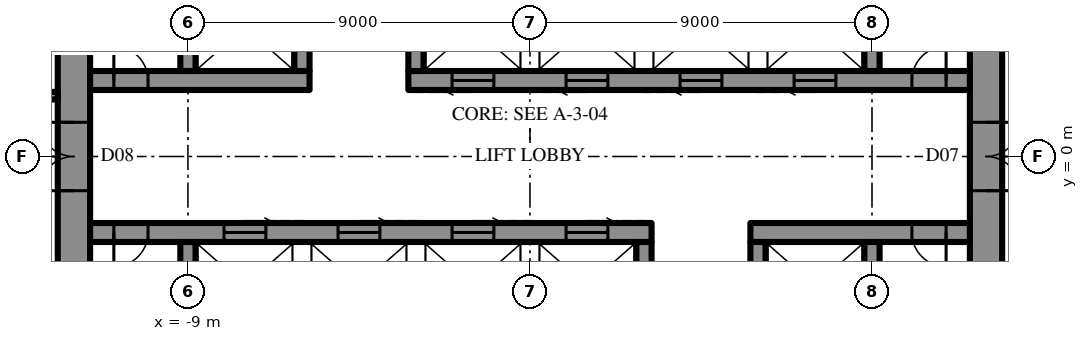
"""IFC4 building model, lengths in metres.
Left out: names, types, materials, properties, quantities, classifications, styles, units other than length and angle.
Written with IfcOpenShell. Run it as: python <this file> out.ifc"""

import sys

from ifc_helpers import new_model, si_unit, direction, frame, frame_2d, origin, place, context, subcontext, project, spatial, rectangle, extrude, element, fill, save


model = new_model("IFC4")
c1 = context("Model", 3, precision=1e-05, world=origin(), true_north=direction((0.0, 1.0)))
c2 = subcontext(c1, "Body", "Model", "MODEL_VIEW")
j1 = project(units=[si_unit("LENGTHUNIT", "METRE"), si_unit("PLANEANGLEUNIT", "RADIAN")], contexts=[c1])
p1 = place(None, origin())
s1 = spatial("IfcSite", under=j1, at=p1, CompositionType="ELEMENT")
p2 = place(p1, origin())
s2 = spatial("IfcBuilding", under=s1, at=p2, CompositionType="ELEMENT")
p3 = place(p2, frame((0.0, 0.0, 387.1)))
s3 = spatial("IfcBuildingStorey", under=s2, at=p3, CompositionType="ELEMENT", Elevation=387.1)
p4 = place(p3, frame((12.0, -10.7, 0.0), z_axis=(0.0, 0.0, 1.0), x_axis=(0.0, 1.0, 0.0)))
e1 = element("IfcWall", 1, at=p4, inside=s3, PredefinedType="SHEAR", context=c2, shape_type="SweptSolid", body=[
    extrude(rectangle(XDim=21.4, YDim=0.85, at=frame_2d((10.7, 0.0))), origin(), (0.0, 0.0, 1.0), 4.2),
])
p5 = place(p4, frame((9.8, 0.0, 0.0)))
e2 = element("IfcOpeningElement", 2, at=p5, cuts=e1, PredefinedType="OPENING", context=c2, shape_type="SweptSolid", body=[
    extrude(rectangle(XDim=1.8, YDim=2.4, at=frame_2d((0.9, 1.2))), frame((0.0, 0.435, 0.0), z_axis=(0.0, -1.0, 0.0), x_axis=(1.0, 0.0, 0.0)), (0.0, 0.0, 1.0), 0.87),
])
p6 = place(p3, frame((-12.0, 10.7, 0.0), z_axis=(0.0, 0.0, 1.0), x_axis=(0.0, -1.0, 0.0)))
e3 = element("IfcWall", 3, at=p6, inside=s3, PredefinedType="SHEAR", context=c2, shape_type="SweptSolid", body=[
    extrude(rectangle(XDim=21.4, YDim=0.85, at=frame_2d((10.7, 0.0))), origin(), (0.0, 0.0, 1.0), 4.2),
])
p7 = place(p6, frame((9.8, 0.0, 0.0)))
e4 = element("IfcOpeningElement", 4, at=p7, cuts=e3, PredefinedType="OPENING", context=c2, shape_type="SweptSolid", body=[
    extrude(rectangle(XDim=1.8, YDim=2.4, at=frame_2d((0.9, 1.2))), frame((0.0, 0.435, 0.0), z_axis=(0.0, -1.0, 0.0), x_axis=(1.0, 0.0, 0.0)), (0.0, 0.0, 1.0), 0.87),
])
p8 = place(p3, frame((-11.575, 2.0, 0.0), z_axis=(0.0, 0.0, 1.0), x_axis=(1.0, 0.0, 0.0)))
e5 = element("IfcWall", 5, at=p8, inside=s3, PredefinedType="SHEAR", context=c2, shape_type="SweptSolid", body=[
    extrude(rectangle(XDim=5.775, YDim=0.5, at=frame_2d((2.887, 0.0))), origin(), (0.0, 0.0, 1.0), 4.2),
])
p9 = place(p8, frame((0.625, 0.0, 0.0)))
e6 = element("IfcOpeningElement", 6, at=p9, cuts=e5, PredefinedType="OPENING", context=c2, shape_type="SweptSolid", body=[
    extrude(rectangle(XDim=0.9, YDim=2.2, at=frame_2d((0.45, 1.1))), frame((0.0, 0.26, 0.0), z_axis=(0.0, -1.0, 0.0), x_axis=(1.0, 0.0, 0.0)), (0.0, 0.0, 1.0), 0.52),
])
p10 = place(p3, frame((-3.2, 2.0, 0.0), z_axis=(0.0, 0.0, 1.0), x_axis=(1.0, 0.0, 0.0)))
e7 = element("IfcWall", 7, at=p10, inside=s3, PredefinedType="SHEAR", context=c2, shape_type="SweptSolid", body=[
    extrude(rectangle(XDim=14.775, YDim=0.5, at=frame_2d((7.387, 0.0))), origin(), (0.0, 0.0, 1.0), 4.2),
])
p11 = place(p10, frame((13.25, 0.0, 0.0)))
e8 = element("IfcOpeningElement", 8, at=p11, cuts=e7, PredefinedType="OPENING", context=c2, shape_type="SweptSolid", body=[
    extrude(rectangle(XDim=0.9, YDim=2.2, at=frame_2d((0.45, 1.1))), frame((0.0, 0.26, 0.0), z_axis=(0.0, -1.0, 0.0), x_axis=(1.0, 0.0, 0.0)), (0.0, 0.0, 1.0), 0.52),
])
p12 = place(p10, frame((1.15, 0.0, 0.0)))
e9 = element("IfcOpeningElement", 9, at=p12, cuts=e7, PredefinedType="OPENING", context=c2, shape_type="SweptSolid", body=[
    extrude(rectangle(XDim=1.1, YDim=2.2, at=frame_2d((0.55, 1.1))), frame((0.0, 0.26, 0.0), z_axis=(0.0, -1.0, 0.0), x_axis=(1.0, 0.0, 0.0)), (0.0, 0.0, 1.0), 0.52),
])
p13 = place(p10, frame((4.15, 0.0, 0.0)))
e10 = element("IfcOpeningElement", 10, at=p13, cuts=e7, PredefinedType="OPENING", context=c2, shape_type="SweptSolid", body=[
    extrude(rectangle(XDim=1.1, YDim=2.2, at=frame_2d((0.55, 1.1))), frame((0.0, 0.26, 0.0), z_axis=(0.0, -1.0, 0.0), x_axis=(1.0, 0.0, 0.0)), (0.0, 0.0, 1.0), 0.52),
])
p14 = place(p10, frame((7.15, 0.0, 0.0)))
e11 = element("IfcOpeningElement", 11, at=p14, cuts=e7, PredefinedType="OPENING", context=c2, shape_type="SweptSolid", body=[
    extrude(rectangle(XDim=1.1, YDim=2.2, at=frame_2d((0.55, 1.1))), frame((0.0, 0.26, 0.0), z_axis=(0.0, -1.0, 0.0), x_axis=(1.0, 0.0, 0.0)), (0.0, 0.0, 1.0), 0.52),
])
p15 = place(p10, frame((10.15, 0.0, 0.0)))
e12 = element("IfcOpeningElement", 12, at=p15, cuts=e7, PredefinedType="OPENING", context=c2, shape_type="SweptSolid", body=[
    extrude(rectangle(XDim=1.1, YDim=2.2, at=frame_2d((0.55, 1.1))), frame((0.0, 0.26, 0.0), z_axis=(0.0, -1.0, 0.0), x_axis=(1.0, 0.0, 0.0)), (0.0, 0.0, 1.0), 0.52),
])
for number, where, z_axis, x_axis in (
    (13, (-9.0, 2.25, 0.0), (0.0, 0.0, 1.0), (0.0, 1.0, 0.0)),
    (14, (-6.0, 2.25, 0.0), (0.0, 0.0, 1.0), (0.0, 1.0, 0.0)),
    (15, (-3.0, 2.25, 0.0), (0.0, 0.0, 1.0), (0.0, 1.0, 0.0)),
    (16, (9.0, 2.25, 0.0), (0.0, 0.0, 1.0), (0.0, 1.0, 0.0)),
):
    element("IfcWall", number, at=place(p3, frame(where, z_axis=z_axis, x_axis=x_axis)), inside=s3, PredefinedType="SHEAR", context=c2, shape_type="SweptSolid", body=[
        extrude(rectangle(XDim=2.3, YDim=0.4, at=frame_2d((1.15, 0.0))), origin(), (0.0, 0.0, 1.0), 4.2),
    ])
p16 = place(p3, frame((11.575, -2.0, 0.0), z_axis=(0.0, 0.0, 1.0), x_axis=(-1.0, 0.0, 0.0)))
e17 = element("IfcWall", 17, at=p16, inside=s3, PredefinedType="SHEAR", context=c2, shape_type="SweptSolid", body=[
    extrude(rectangle(XDim=5.775, YDim=0.5, at=frame_2d((2.887, 0.0))), origin(), (0.0, 0.0, 1.0), 4.2),
])
p17 = place(p16, frame((0.625, 0.0, 0.0)))
e18 = element("IfcOpeningElement", 18, at=p17, cuts=e17, PredefinedType="OPENING", context=c2, shape_type="SweptSolid", body=[
    extrude(rectangle(XDim=0.9, YDim=2.2, at=frame_2d((0.45, 1.1))), frame((0.0, 0.26, 0.0), z_axis=(0.0, -1.0, 0.0), x_axis=(1.0, 0.0, 0.0)), (0.0, 0.0, 1.0), 0.52),
])
p18 = place(p3, frame((3.2, -2.0, 0.0), z_axis=(0.0, 0.0, 1.0), x_axis=(-1.0, 0.0, 0.0)))
e19 = element("IfcWall", 19, at=p18, inside=s3, PredefinedType="SHEAR", context=c2, shape_type="SweptSolid", body=[
    extrude(rectangle(XDim=14.775, YDim=0.5, at=frame_2d((7.387, 0.0))), origin(), (0.0, 0.0, 1.0), 4.2),
])
p19 = place(p18, frame((13.25, 0.0, 0.0)))
e20 = element("IfcOpeningElement", 20, at=p19, cuts=e19, PredefinedType="OPENING", context=c2, shape_type="SweptSolid", body=[
    extrude(rectangle(XDim=0.9, YDim=2.2, at=frame_2d((0.45, 1.1))), frame((0.0, 0.26, 0.0), z_axis=(0.0, -1.0, 0.0), x_axis=(1.0, 0.0, 0.0)), (0.0, 0.0, 1.0), 0.52),
])
p20 = place(p18, frame((1.15, 0.0, 0.0)))
e21 = element("IfcOpeningElement", 21, at=p20, cuts=e19, PredefinedType="OPENING", context=c2, shape_type="SweptSolid", body=[
    extrude(rectangle(XDim=1.1, YDim=2.2, at=frame_2d((0.55, 1.1))), frame((0.0, 0.26, 0.0), z_axis=(0.0, -1.0, 0.0), x_axis=(1.0, 0.0, 0.0)), (0.0, 0.0, 1.0), 0.52),
])
p21 = place(p18, frame((4.15, 0.0, 0.0)))
e22 = element("IfcOpeningElement", 22, at=p21, cuts=e19, PredefinedType="OPENING", context=c2, shape_type="SweptSolid", body=[
    extrude(rectangle(XDim=1.1, YDim=2.2, at=frame_2d((0.55, 1.1))), frame((0.0, 0.26, 0.0), z_axis=(0.0, -1.0, 0.0), x_axis=(1.0, 0.0, 0.0)), (0.0, 0.0, 1.0), 0.52),
])
p22 = place(p18, frame((7.15, 0.0, 0.0)))
e23 = element("IfcOpeningElement", 23, at=p22, cuts=e19, PredefinedType="OPENING", context=c2, shape_type="SweptSolid", body=[
    extrude(rectangle(XDim=1.1, YDim=2.2, at=frame_2d((0.55, 1.1))), frame((0.0, 0.26, 0.0), z_axis=(0.0, -1.0, 0.0), x_axis=(1.0, 0.0, 0.0)), (0.0, 0.0, 1.0), 0.52),
])
p23 = place(p18, frame((10.15, 0.0, 0.0)))
e24 = element("IfcOpeningElement", 24, at=p23, cuts=e19, PredefinedType="OPENING", context=c2, shape_type="SweptSolid", body=[
    extrude(rectangle(XDim=1.1, YDim=2.2, at=frame_2d((0.55, 1.1))), frame((0.0, 0.26, 0.0), z_axis=(0.0, -1.0, 0.0), x_axis=(1.0, 0.0, 0.0)), (0.0, 0.0, 1.0), 0.52),
])
for number, where, z_axis, x_axis in (
    (25, (9.0, -2.25, 0.0), (0.0, 0.0, 1.0), (0.0, -1.0, 0.0)),
    (26, (6.0, -2.25, 0.0), (0.0, 0.0, 1.0), (0.0, -1.0, 0.0)),
    (27, (3.0, -2.25, 0.0), (0.0, 0.0, 1.0), (0.0, -1.0, 0.0)),
    (28, (-9.0, -2.25, 0.0), (0.0, 0.0, 1.0), (0.0, -1.0, 0.0)),
):
    element("IfcWall", number, at=place(p3, frame(where, z_axis=z_axis, x_axis=x_axis)), inside=s3, PredefinedType="SHEAR", context=c2, shape_type="SweptSolid", body=[
        extrude(rectangle(XDim=2.3, YDim=0.4, at=frame_2d((1.15, 0.0))), origin(), (0.0, 0.0, 1.0), 4.2),
    ])
p24 = place(p3, frame((-12.425, 1.6, 0.0), z_axis=(0.0, 0.0, 1.0), x_axis=(-1.0, 0.0, 0.0)))
e29 = element("IfcWall", 29, at=p24, inside=s3, PredefinedType="PARTITIONING", context=c2, shape_type="SweptSolid", body=[
    extrude(rectangle(XDim=16.558, YDim=0.2, at=frame_2d((8.279, 0.0))), origin(), (0.0, 0.0, 1.0), 4.0),
])
p25 = place(p24, frame((1.156, 0.0, 0.0)))
e30 = element("IfcOpeningElement", 30, at=p25, cuts=e29, PredefinedType="OPENING", context=c2, shape_type="SweptSolid", body=[
    extrude(rectangle(XDim=1.0, YDim=2.2, at=frame_2d((0.5, 1.1))), frame((0.0, 0.11, 0.0), z_axis=(0.0, -1.0, 0.0), x_axis=(1.0, 0.0, 0.0)), (0.0, 0.0, 1.0), 0.22),
])
p26 = place(p5, frame((1.8, 0.0, 0.0), z_axis=(0.0, 0.0, 1.0), x_axis=(-1.0, 0.0, 0.0)))
e31 = element("IfcDoor", 31, at=p26, inside=s3, OperationType="DOUBLE_DOOR_SINGLE_SWING", PredefinedType="DOOR", context=c2, shape_type="SweptSolid", body=[
    extrude(rectangle(XDim=1.8, YDim=2.4, at=frame_2d((0.9, 1.2))), frame((0.0, 0.025, 0.0), z_axis=(0.0, -1.0, 0.0), x_axis=(1.0, 0.0, 0.0)), (0.0, 0.0, 1.0), 0.05),
])
fill(e2, e31)
p27 = place(p7, frame((1.8, 0.0, 0.0), z_axis=(0.0, 0.0, 1.0), x_axis=(-1.0, 0.0, 0.0)))
e32 = element("IfcDoor", 32, at=p27, inside=s3, OperationType="DOUBLE_DOOR_SINGLE_SWING", PredefinedType="DOOR", context=c2, shape_type="SweptSolid", body=[
    extrude(rectangle(XDim=1.8, YDim=2.4, at=frame_2d((0.9, 1.2))), frame((0.0, 0.025, 0.0), z_axis=(0.0, -1.0, 0.0), x_axis=(1.0, 0.0, 0.0)), (0.0, 0.0, 1.0), 0.05),
])
fill(e4, e32)
p28 = place(p9, origin())
e33 = element("IfcDoor", 33, at=p28, inside=s3, OperationType="SINGLE_SWING_RIGHT", PredefinedType="DOOR", context=c2, shape_type="SweptSolid", body=[
    extrude(rectangle(XDim=0.9, YDim=2.2, at=frame_2d((0.45, 1.1))), frame((0.0, 0.025, 0.0), z_axis=(0.0, -1.0, 0.0), x_axis=(1.0, 0.0, 0.0)), (0.0, 0.0, 1.0), 0.05),
])
fill(e6, e33)
p29 = place(p11, origin())
e34 = element("IfcDoor", 34, at=p29, inside=s3, OperationType="SINGLE_SWING_LEFT", PredefinedType="DOOR", context=c2, shape_type="SweptSolid", body=[
    extrude(rectangle(XDim=0.9, YDim=2.2, at=frame_2d((0.45, 1.1))), frame((0.0, 0.025, 0.0), z_axis=(0.0, -1.0, 0.0), x_axis=(1.0, 0.0, 0.0)), (0.0, 0.0, 1.0), 0.05),
])
fill(e8, e34)
p30 = place(p17, origin())
e35 = element("IfcDoor", 35, at=p30, inside=s3, OperationType="SINGLE_SWING_RIGHT", PredefinedType="DOOR", context=c2, shape_type="SweptSolid", body=[
    extrude(rectangle(XDim=0.9, YDim=2.2, at=frame_2d((0.45, 1.1))), frame((0.0, 0.025, 0.0), z_axis=(0.0, -1.0, 0.0), x_axis=(1.0, 0.0, 0.0)), (0.0, 0.0, 1.0), 0.05),
])
fill(e18, e35)
p31 = place(p19, origin())
e36 = element("IfcDoor", 36, at=p31, inside=s3, OperationType="SINGLE_SWING_LEFT", PredefinedType="DOOR", context=c2, shape_type="SweptSolid", body=[
    extrude(rectangle(XDim=0.9, YDim=2.2, at=frame_2d((0.45, 1.1))), frame((0.0, 0.025, 0.0), z_axis=(0.0, -1.0, 0.0), x_axis=(1.0, 0.0, 0.0)), (0.0, 0.0, 1.0), 0.05),
])
fill(e20, e36)
p32 = place(p12, frame((1.1, 0.0, 0.0), z_axis=(0.0, 0.0, 1.0), x_axis=(-1.0, 0.0, 0.0)))
e37 = element("IfcDoor", 37, at=p32, inside=s3, OperationType="SLIDING_TO_LEFT", PredefinedType="DOOR", context=c2, shape_type="SweptSolid", body=[
    extrude(rectangle(XDim=1.1, YDim=2.2, at=frame_2d((0.55, 1.1))), frame((0.0, 0.025, 0.0), z_axis=(0.0, -1.0, 0.0), x_axis=(1.0, 0.0, 0.0)), (0.0, 0.0, 1.0), 0.05),
])
fill(e9, e37)
p33 = place(p13, frame((1.1, 0.0, 0.0), z_axis=(0.0, 0.0, 1.0), x_axis=(-1.0, 0.0, 0.0)))
e38 = element("IfcDoor", 38, at=p33, inside=s3, OperationType="SLIDING_TO_LEFT", PredefinedType="DOOR", context=c2, shape_type="SweptSolid", body=[
    extrude(rectangle(XDim=1.1, YDim=2.2, at=frame_2d((0.55, 1.1))), frame((0.0, 0.025, 0.0), z_axis=(0.0, -1.0, 0.0), x_axis=(1.0, 0.0, 0.0)), (0.0, 0.0, 1.0), 0.05),
])
fill(e10, e38)
p34 = place(p14, frame((1.1, 0.0, 0.0), z_axis=(0.0, 0.0, 1.0), x_axis=(-1.0, 0.0, 0.0)))
e39 = element("IfcDoor", 39, at=p34, inside=s3, OperationType="SLIDING_TO_LEFT", PredefinedType="DOOR", context=c2, shape_type="SweptSolid", body=[
    extrude(rectangle(XDim=1.1, YDim=2.2, at=frame_2d((0.55, 1.1))), frame((0.0, 0.025, 0.0), z_axis=(0.0, -1.0, 0.0), x_axis=(1.0, 0.0, 0.0)), (0.0, 0.0, 1.0), 0.05),
])
fill(e11, e39)
p35 = place(p15, frame((1.1, 0.0, 0.0), z_axis=(0.0, 0.0, 1.0), x_axis=(-1.0, 0.0, 0.0)))
e40 = element("IfcDoor", 40, at=p35, inside=s3, OperationType="SLIDING_TO_LEFT", PredefinedType="DOOR", context=c2, shape_type="SweptSolid", body=[
    extrude(rectangle(XDim=1.1, YDim=2.2, at=frame_2d((0.55, 1.1))), frame((0.0, 0.025, 0.0), z_axis=(0.0, -1.0, 0.0), x_axis=(1.0, 0.0, 0.0)), (0.0, 0.0, 1.0), 0.05),
])
fill(e12, e40)
p36 = place(p20, frame((1.1, 0.0, 0.0), z_axis=(0.0, 0.0, 1.0), x_axis=(-1.0, 0.0, 0.0)))
e41 = element("IfcDoor", 41, at=p36, inside=s3, OperationType="SLIDING_TO_LEFT", PredefinedType="DOOR", context=c2, shape_type="SweptSolid", body=[
    extrude(rectangle(XDim=1.1, YDim=2.2, at=frame_2d((0.55, 1.1))), frame((0.0, 0.025, 0.0), z_axis=(0.0, -1.0, 0.0), x_axis=(1.0, 0.0, 0.0)), (0.0, 0.0, 1.0), 0.05),
])
fill(e21, e41)
p37 = place(p21, frame((1.1, 0.0, 0.0), z_axis=(0.0, 0.0, 1.0), x_axis=(-1.0, 0.0, 0.0)))
e42 = element("IfcDoor", 42, at=p37, inside=s3, OperationType="SLIDING_TO_LEFT", PredefinedType="DOOR", context=c2, shape_type="SweptSolid", body=[
    extrude(rectangle(XDim=1.1, YDim=2.2, at=frame_2d((0.55, 1.1))), frame((0.0, 0.025, 0.0), z_axis=(0.0, -1.0, 0.0), x_axis=(1.0, 0.0, 0.0)), (0.0, 0.0, 1.0), 0.05),
])
fill(e22, e42)
p38 = place(p22, frame((1.1, 0.0, 0.0), z_axis=(0.0, 0.0, 1.0), x_axis=(-1.0, 0.0, 0.0)))
e43 = element("IfcDoor", 43, at=p38, inside=s3, OperationType="SLIDING_TO_LEFT", PredefinedType="DOOR", context=c2, shape_type="SweptSolid", body=[
    extrude(rectangle(XDim=1.1, YDim=2.2, at=frame_2d((0.55, 1.1))), frame((0.0, 0.025, 0.0), z_axis=(0.0, -1.0, 0.0), x_axis=(1.0, 0.0, 0.0)), (0.0, 0.0, 1.0), 0.05),
])
fill(e23, e43)
p39 = place(p23, frame((1.1, 0.0, 0.0), z_axis=(0.0, 0.0, 1.0), x_axis=(-1.0, 0.0, 0.0)))
e44 = element("IfcDoor", 44, at=p39, inside=s3, OperationType="SLIDING_TO_LEFT", PredefinedType="DOOR", context=c2, shape_type="SweptSolid", body=[
    extrude(rectangle(XDim=1.1, YDim=2.2, at=frame_2d((0.55, 1.1))), frame((0.0, 0.025, 0.0), z_axis=(0.0, -1.0, 0.0), x_axis=(1.0, 0.0, 0.0)), (0.0, 0.0, 1.0), 0.05),
])
fill(e24, e44)
save(model, sys.argv[1])
